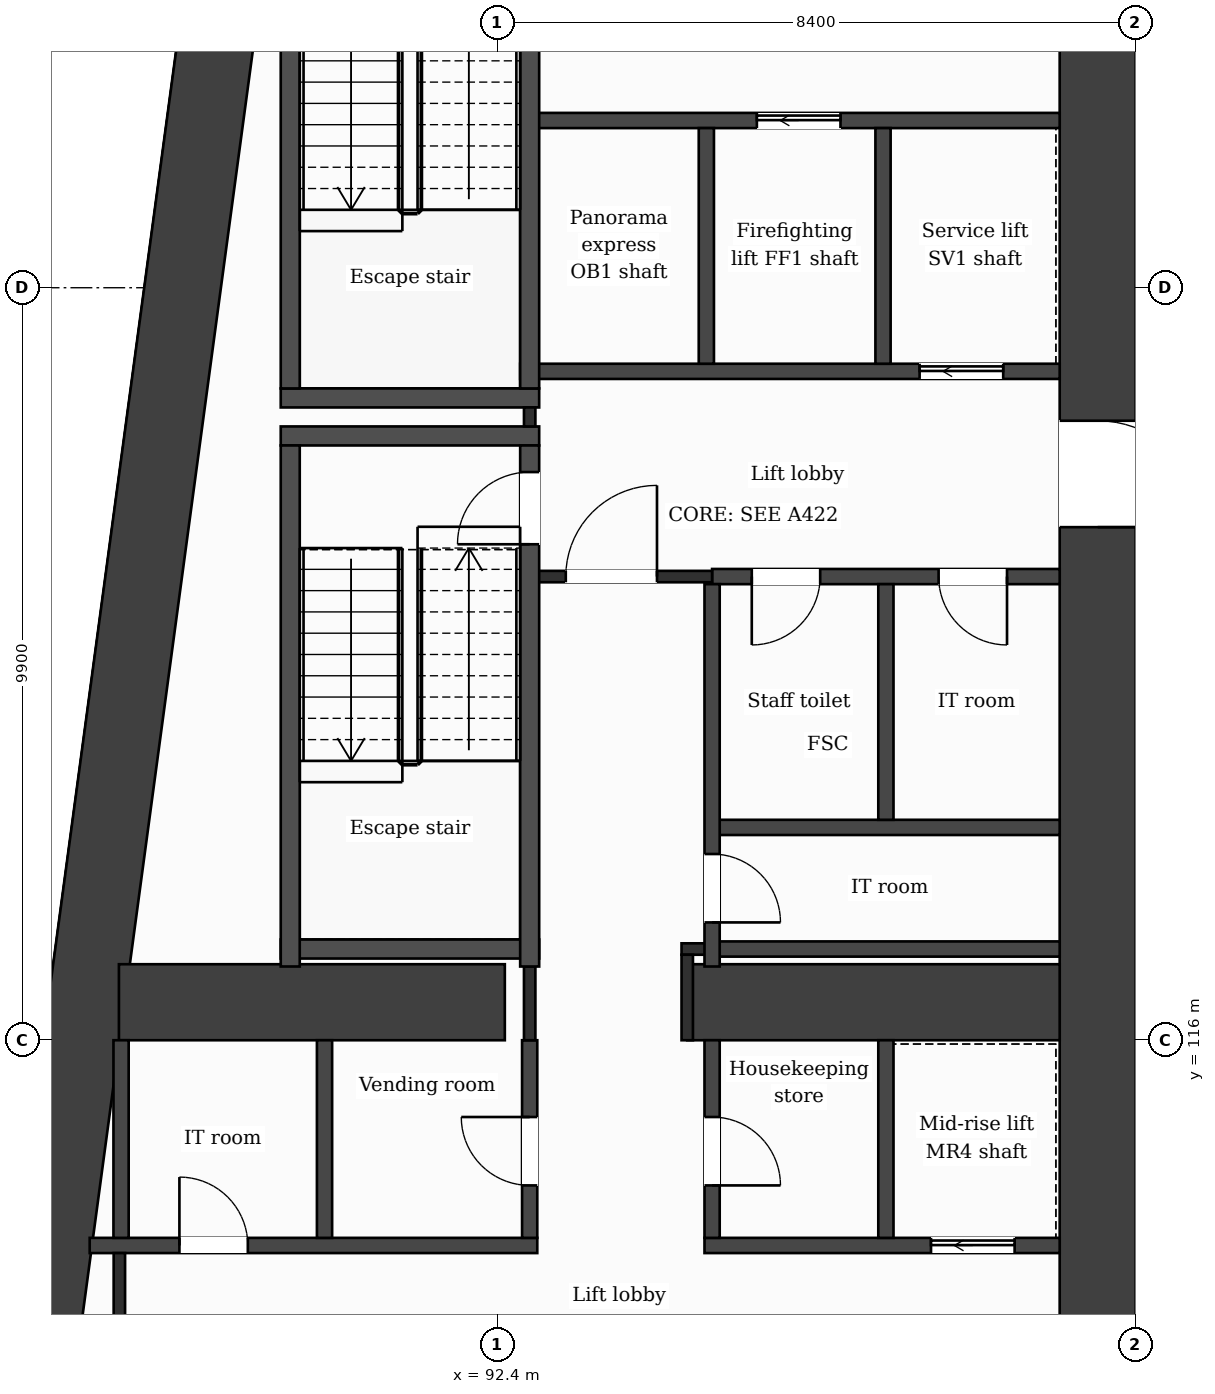
"""IFC4 building model, lengths in metres.
Left out: names, types, materials, properties, quantities, classifications, styles, units other than length and angle.
Written with IfcOpenShell. Run it as: python <this file> out.ifc"""

import sys

from ifc_helpers import new_model, si_unit, direction, frame, frame_2d, origin, place, context, subcontext, project, spatial, rectangle, extrude, element, fill, save


model = new_model("IFC4")
c1 = context("Model", 3, precision=1e-05, world=origin(), true_north=direction((0.0, 1.0)))
c2 = subcontext(c1, "Body", "Model", "MODEL_VIEW")
j1 = project(units=[si_unit("LENGTHUNIT", "METRE"), si_unit("PLANEANGLEUNIT", "RADIAN")], contexts=[c1])
p1 = place(None, origin())
s1 = spatial("IfcSite", under=j1, at=p1, CompositionType="ELEMENT")
p2 = place(p1, origin())
s2 = spatial("IfcBuilding", under=s1, at=p2, CompositionType="ELEMENT")
p3 = place(p2, frame((0.0, 0.0, 94.7)))
s3 = spatial("IfcBuildingStorey", under=s2, at=p3, CompositionType="ELEMENT", Elevation=94.7)
p4 = place(p3, frame((100.3, 131.9, 0.0), z_axis=(0.0, 0.0, 1.0), x_axis=(0.0, -1.0, 0.0)))
e1 = element("IfcWall", 1, at=p4, inside=s3, PredefinedType="SHEAR", context=c2, shape_type="SweptSolid", body=[
    extrude(rectangle(XDim=21.0, YDim=1.0, at=frame_2d((10.5, 0.0))), origin(), (0.0, 0.0, 1.0), 3.7),
])
p5 = place(p4, frame((7.75, 0.0, 0.0)))
e2 = element("IfcOpeningElement", 2, at=p5, cuts=e1, PredefinedType="OPENING", context=c2, shape_type="SweptSolid", body=[
    extrude(rectangle(XDim=1.4, YDim=2.1, at=frame_2d((0.7, 1.05))), frame((0.0, 0.51, 0.0), z_axis=(0.0, -1.0, 0.0), x_axis=(1.0, 0.0, 0.0)), (0.0, 0.0, 1.0), 1.02),
])
p6 = place(p3, frame((86.241, 110.9, 0.0), z_axis=(0.0, 0.0, 1.0), x_axis=(0.133411141623, 0.991060778808, 0.0)))
e3 = element("IfcWall", 3, at=p6, inside=s3, PredefinedType="SHEAR", context=c2, shape_type="SweptSolid", body=[
    extrude(rectangle(XDim=21.189, YDim=1.0, at=frame_2d((10.595, 0.0))), origin(), (0.0, 0.0, 1.0), 3.7),
])
p7 = place(p3, frame((87.423, 116.5, 0.0), z_axis=(0.0, 0.0, 1.0), x_axis=(1.0, 0.0, 0.0)))
e4 = element("IfcWall", 4, at=p7, inside=s3, PredefinedType="SHEAR", context=c2, shape_type="SweptSolid", body=[
    extrude(rectangle(XDim=5.077, YDim=1.0, at=frame_2d((2.539, 0.0))), origin(), (0.0, 0.0, 1.0), 3.7),
])
p8 = place(p3, frame((94.9, 116.5, 0.0), z_axis=(0.0, 0.0, 1.0), x_axis=(1.0, 0.0, 0.0)))
e5 = element("IfcWall", 5, at=p8, inside=s3, PredefinedType="SHEAR", context=c2, shape_type="SweptSolid", body=[
    extrude(rectangle(XDim=4.9, YDim=1.0, at=frame_2d((2.45, 0.0))), origin(), (0.0, 0.0, 1.0), 3.7),
])
p9 = place(p3, frame((87.039, 113.3, 0.0), z_axis=(0.0, 0.0, 1.0), x_axis=(1.0, 0.0, 0.0)))
e6 = element("IfcWall", 6, at=p9, inside=s3, PredefinedType="PARTITIONING", context=c2, shape_type="SweptSolid", body=[
    extrude(rectangle(XDim=5.888, YDim=0.2, at=frame_2d((2.944, 0.0))), origin(), (0.0, 0.0, 1.0), 3.38),
])
p10 = place(p9, frame((1.18, 0.0, 0.0)))
e7 = element("IfcOpeningElement", 7, at=p10, cuts=e6, PredefinedType="OPENING", context=c2, shape_type="SweptSolid", body=[
    extrude(rectangle(XDim=0.9, YDim=2.1, at=frame_2d((0.45, 1.05))), frame((0.0, 0.11, 0.0), z_axis=(0.0, -1.0, 0.0), x_axis=(1.0, 0.0, 0.0)), (0.0, 0.0, 1.0), 0.22),
])
p11 = place(p3, frame((95.127, 113.3, 0.0), z_axis=(0.0, 0.0, 1.0), x_axis=(1.0, 0.0, 0.0)))
e8 = element("IfcWall", 8, at=p11, inside=s3, PredefinedType="PARTITIONING", context=c2, shape_type="SweptSolid", body=[
    extrude(rectangle(XDim=4.673, YDim=0.2, at=frame_2d((2.336, 0.0))), origin(), (0.0, 0.0, 1.0), 3.38),
])
p12 = place(p11, frame((2.98, 0.0, 0.0)))
e9 = element("IfcOpeningElement", 9, at=p12, cuts=e8, PredefinedType="OPENING", context=c2, shape_type="SweptSolid", body=[
    extrude(rectangle(XDim=1.1, YDim=2.1, at=frame_2d((0.55, 1.05))), frame((0.0, 0.11, 0.0), z_axis=(0.0, -1.0, 0.0), x_axis=(1.0, 0.0, 0.0)), (0.0, 0.0, 1.0), 0.22),
])
p13 = place(p3, frame((95.227, 117.2, 0.0), z_axis=(0.0, 0.0, 1.0), x_axis=(1.0, 0.0, 0.0)))
e10 = element("IfcWall", 10, at=p13, inside=s3, PredefinedType="PARTITIONING", context=c2, shape_type="SweptSolid", body=[
    extrude(rectangle(XDim=4.573, YDim=0.2, at=frame_2d((2.287, 0.0))), origin(), (0.0, 0.0, 1.0), 3.38),
])
p14 = place(p3, frame((94.825, 117.2, 0.0), z_axis=(0.0, 0.0, 1.0), x_axis=(1.0, 0.0, 0.0)))
e11 = element("IfcWall", 11, at=p14, inside=s3, PredefinedType="PARTITIONING", context=c2, shape_type="SweptSolid", body=[
    extrude(rectangle(XDim=0.402, YDim=0.15, at=frame_2d((0.201, 0.0))), origin(), (0.0, 0.0, 1.0), 3.38),
])
p15 = place(p3, frame((89.552, 117.2, 0.0), z_axis=(0.0, 0.0, 1.0), x_axis=(1.0, 0.0, 0.0)))
e12 = element("IfcWall", 12, at=p15, inside=s3, PredefinedType="PARTITIONING", context=c2, shape_type="SweptSolid", body=[
    extrude(rectangle(XDim=3.4, YDim=0.25, at=frame_2d((1.7, 0.0))), origin(), (0.0, 0.0, 1.0), 3.38),
])
p16 = place(p3, frame((95.227, 118.8, 0.0), z_axis=(0.0, 0.0, 1.0), x_axis=(1.0, 0.0, 0.0)))
e13 = element("IfcWall", 13, at=p16, inside=s3, PredefinedType="PARTITIONING", context=c2, shape_type="SweptSolid", body=[
    extrude(rectangle(XDim=4.573, YDim=0.2, at=frame_2d((2.287, 0.0))), origin(), (0.0, 0.0, 1.0), 3.38),
])
p17 = place(p3, frame((95.227, 122.1, 0.0), z_axis=(0.0, 0.0, 1.0), x_axis=(1.0, 0.0, 0.0)))
e14 = element("IfcWall", 14, at=p17, inside=s3, PredefinedType="PARTITIONING", context=c2, shape_type="SweptSolid", body=[
    extrude(rectangle(XDim=4.573, YDim=0.2, at=frame_2d((2.287, 0.0))), origin(), (0.0, 0.0, 1.0), 3.38),
])
p18 = place(p17, frame((0.522, 0.0, 0.0)))
e15 = element("IfcOpeningElement", 15, at=p18, cuts=e14, PredefinedType="OPENING", context=c2, shape_type="SweptSolid", body=[
    extrude(rectangle(XDim=0.9, YDim=2.1, at=frame_2d((0.45, 1.05))), frame((0.0, 0.11, 0.0), z_axis=(0.0, -1.0, 0.0), x_axis=(1.0, 0.0, 0.0)), (0.0, 0.0, 1.0), 0.22),
])
p19 = place(p17, frame((2.98, 0.0, 0.0)))
e16 = element("IfcOpeningElement", 16, at=p19, cuts=e14, PredefinedType="OPENING", context=c2, shape_type="SweptSolid", body=[
    extrude(rectangle(XDim=0.9, YDim=2.1, at=frame_2d((0.45, 1.05))), frame((0.0, 0.11, 0.0), z_axis=(0.0, -1.0, 0.0), x_axis=(1.0, 0.0, 0.0)), (0.0, 0.0, 1.0), 0.22),
])
p20 = place(p3, frame((92.827, 122.1, 0.0), z_axis=(0.0, 0.0, 1.0), x_axis=(1.0, 0.0, 0.0)))
e17 = element("IfcWall", 17, at=p20, inside=s3, PredefinedType="PARTITIONING", context=c2, shape_type="SweptSolid", body=[
    extrude(rectangle(XDim=2.4, YDim=0.15, at=frame_2d((1.2, 0.0))), origin(), (0.0, 0.0, 1.0), 3.38),
])
p21 = place(p20, frame((0.475, 0.0, 0.0)))
e18 = element("IfcOpeningElement", 18, at=p21, cuts=e17, PredefinedType="OPENING", context=c2, shape_type="SweptSolid", body=[
    extrude(rectangle(XDim=1.2, YDim=2.1, at=frame_2d((0.6, 1.05))), frame((0.0, 0.085, 0.0), z_axis=(0.0, -1.0, 0.0), x_axis=(1.0, 0.0, 0.0)), (0.0, 0.0, 1.0), 0.17),
])
for number, where, z_axis, x_axis in (
    (19, (89.552, 123.95, 0.0), (0.0, 0.0, 1.0), (1.0, 0.0, 0.0)),
    (20, (89.552, 124.45, 0.0), (0.0, 0.0, 1.0), (1.0, 0.0, 0.0)),
):
    element("IfcWall", number, at=place(p3, frame(where, z_axis=z_axis, x_axis=x_axis)), inside=s3, PredefinedType="PARTITIONING", context=c2, shape_type="SweptSolid", body=[
        extrude(rectangle(XDim=3.4, YDim=0.25, at=frame_2d((1.7, 0.0))), origin(), (0.0, 0.0, 1.0), 3.38),
    ])
p22 = place(p3, frame((92.702, 124.8, 0.0), z_axis=(0.0, 0.0, 1.0), x_axis=(1.0, 0.0, 0.0)))
e21 = element("IfcWall", 21, at=p22, inside=s3, PredefinedType="PARTITIONING", context=c2, shape_type="SweptSolid", body=[
    extrude(rectangle(XDim=7.098, YDim=0.2, at=frame_2d((3.549, 0.0))), origin(), (0.0, 0.0, 1.0), 3.38),
])
p23 = place(p22, frame((5.255, 0.0, 0.0)))
e22 = element("IfcOpeningElement", 22, at=p23, cuts=e21, PredefinedType="OPENING", context=c2, shape_type="SweptSolid", body=[
    extrude(rectangle(XDim=1.1, YDim=2.1, at=frame_2d((0.55, 1.05))), frame((0.0, 0.11, 0.0), z_axis=(0.0, -1.0, 0.0), x_axis=(1.0, 0.0, 0.0)), (0.0, 0.0, 1.0), 0.22),
])
p24 = place(p3, frame((92.827, 128.1, 0.0), z_axis=(0.0, 0.0, 1.0), x_axis=(1.0, 0.0, 0.0)))
e23 = element("IfcWall", 23, at=p24, inside=s3, PredefinedType="PARTITIONING", context=c2, shape_type="SweptSolid", body=[
    extrude(rectangle(XDim=6.973, YDim=0.2, at=frame_2d((3.487, 0.0))), origin(), (0.0, 0.0, 1.0), 3.38),
])
p25 = place(p24, frame((2.989, 0.0, 0.0)))
e24 = element("IfcOpeningElement", 24, at=p25, cuts=e23, PredefinedType="OPENING", context=c2, shape_type="SweptSolid", body=[
    extrude(rectangle(XDim=1.1, YDim=2.1, at=frame_2d((0.55, 1.05))), frame((0.0, 0.11, 0.0), z_axis=(0.0, -1.0, 0.0), x_axis=(1.0, 0.0, 0.0)), (0.0, 0.0, 1.0), 0.22),
])
p26 = place(p3, frame((87.451, 113.4, 0.0), z_axis=(0.0, 0.0, 1.0), x_axis=(0.0, 1.0, 0.0)))
e25 = element("IfcWall", 25, at=p26, inside=s3, PredefinedType="PARTITIONING", context=c2, shape_type="SweptSolid", body=[
    extrude(rectangle(XDim=2.6, YDim=0.2, at=frame_2d((1.3, 0.0))), origin(), (0.0, 0.0, 1.0), 3.38),
])
p27 = place(p3, frame((87.429, 111.4, 0.0), z_axis=(0.0, 0.0, 1.0), x_axis=(0.0, 1.0, 0.0)))
e26 = element("IfcWall", 26, at=p27, inside=s3, PredefinedType="PARTITIONING", context=c2, shape_type="SweptSolid", body=[
    extrude(rectangle(XDim=1.8, YDim=0.15, at=frame_2d((0.9, 0.0))), origin(), (0.0, 0.0, 1.0), 3.38),
])
for number, where, z_axis, x_axis in (
    (27, (89.677, 116.97, 0.0), (0.0, 0.0, 1.0), (0.0, 1.0, 0.0)),
    (28, (89.677, 124.575, 0.0), (0.0, 0.0, 1.0), (0.0, 1.0, 0.0)),
):
    element("IfcWall", number, at=place(p3, frame(where, z_axis=z_axis, x_axis=x_axis)), inside=s3, PredefinedType="PARTITIONING", context=c2, shape_type="SweptSolid", body=[
        extrude(rectangle(XDim=6.855, YDim=0.25, at=frame_2d((3.427, 0.0))), origin(), (0.0, 0.0, 1.0), 3.38),
    ])
p28 = place(p3, frame((90.128, 113.4, 0.0), z_axis=(0.0, 0.0, 1.0), x_axis=(0.0, 1.0, 0.0)))
e29 = element("IfcWall", 29, at=p28, inside=s3, PredefinedType="PARTITIONING", context=c2, shape_type="SweptSolid", body=[
    extrude(rectangle(XDim=2.6, YDim=0.2, at=frame_2d((1.3, 0.0))), origin(), (0.0, 0.0, 1.0), 3.38),
])
p29 = place(p3, frame((92.827, 113.4, 0.0), z_axis=(0.0, 0.0, 1.0), x_axis=(0.0, 1.0, 0.0)))
e30 = element("IfcWall", 30, at=p29, inside=s3, PredefinedType="PARTITIONING", context=c2, shape_type="SweptSolid", body=[
    extrude(rectangle(XDim=2.6, YDim=0.2, at=frame_2d((1.3, 0.0))), origin(), (0.0, 0.0, 1.0), 3.38),
])
p30 = place(p29, frame((0.69, 0.0, 0.0)))
e31 = element("IfcOpeningElement", 31, at=p30, cuts=e30, PredefinedType="OPENING", context=c2, shape_type="SweptSolid", body=[
    extrude(rectangle(XDim=0.9, YDim=2.1, at=frame_2d((0.45, 1.05))), frame((0.0, 0.11, 0.0), z_axis=(0.0, -1.0, 0.0), x_axis=(1.0, 0.0, 0.0)), (0.0, 0.0, 1.0), 0.22),
])
p31 = place(p3, frame((92.827, 116.0, 0.0), z_axis=(0.0, 0.0, 1.0), x_axis=(0.0, 1.0, 0.0)))
e32 = element("IfcWall", 32, at=p31, inside=s3, PredefinedType="PARTITIONING", context=c2, shape_type="SweptSolid", body=[
    extrude(rectangle(XDim=0.97, YDim=0.15, at=frame_2d((0.485, 0.0))), origin(), (0.0, 0.0, 1.0), 3.38),
])
p32 = place(p3, frame((92.827, 124.075, 0.0), z_axis=(0.0, 0.0, 1.0), x_axis=(0.0, 1.0, 0.0)))
e33 = element("IfcWall", 33, at=p32, inside=s3, PredefinedType="PARTITIONING", context=c2, shape_type="SweptSolid", body=[
    extrude(rectangle(XDim=0.25, YDim=0.15, at=frame_2d((0.125, 0.0))), origin(), (0.0, 0.0, 1.0), 3.38),
])
p33 = place(p3, frame((92.827, 116.97, 0.0), z_axis=(0.0, 0.0, 1.0), x_axis=(0.0, 1.0, 0.0)))
e34 = element("IfcWall", 34, at=p33, inside=s3, PredefinedType="PARTITIONING", context=c2, shape_type="SweptSolid", body=[
    extrude(rectangle(XDim=6.855, YDim=0.25, at=frame_2d((3.427, 0.0))), origin(), (0.0, 0.0, 1.0), 3.38),
])
p34 = place(p33, frame((5.555, 0.0, 0.0)))
e35 = element("IfcOpeningElement", 35, at=p34, cuts=e34, PredefinedType="OPENING", context=c2, shape_type="SweptSolid", body=[
    extrude(rectangle(XDim=0.95, YDim=2.1, at=frame_2d((0.475, 1.05))), frame((0.0, 0.135, 0.0), z_axis=(0.0, -1.0, 0.0), x_axis=(1.0, 0.0, 0.0)), (0.0, 0.0, 1.0), 0.27),
])
p35 = place(p3, frame((92.827, 124.575, 0.0), z_axis=(0.0, 0.0, 1.0), x_axis=(0.0, 1.0, 0.0)))
e36 = element("IfcWall", 36, at=p35, inside=s3, PredefinedType="PARTITIONING", context=c2, shape_type="SweptSolid", body=[
    extrude(rectangle(XDim=6.855, YDim=0.25, at=frame_2d((3.427, 0.0))), origin(), (0.0, 0.0, 1.0), 3.38),
])
p36 = place(p35, frame((5.325, 0.0, 0.0)))
e37 = element("IfcOpeningElement", 37, at=p36, cuts=e36, PredefinedType="OPENING", context=c2, shape_type="SweptSolid", body=[
    extrude(rectangle(XDim=1.0, YDim=2.1, at=frame_2d((0.5, 1.05))), frame((0.0, 0.135, 0.0), z_axis=(0.0, -1.0, 0.0), x_axis=(1.0, 0.0, 0.0)), (0.0, 0.0, 1.0), 0.27),
])
p37 = place(p3, frame((94.9, 116.0, 0.0), z_axis=(0.0, 0.0, 1.0), x_axis=(0.0, 1.0, 0.0)))
e38 = element("IfcWall", 38, at=p37, inside=s3, PredefinedType="PARTITIONING", context=c2, shape_type="SweptSolid", body=[
    extrude(rectangle(XDim=1.125, YDim=0.15, at=frame_2d((0.562, 0.0))), origin(), (0.0, 0.0, 1.0), 3.38),
])
p38 = place(p3, frame((95.151, 124.9, 0.0), z_axis=(0.0, 0.0, 1.0), x_axis=(0.0, 1.0, 0.0)))
e39 = element("IfcWall", 39, at=p38, inside=s3, PredefinedType="PARTITIONING", context=c2, shape_type="SweptSolid", body=[
    extrude(rectangle(XDim=3.1, YDim=0.2, at=frame_2d((1.55, 0.0))), origin(), (0.0, 0.0, 1.0), 3.38),
])
p39 = place(p3, frame((95.227, 113.4, 0.0), z_axis=(0.0, 0.0, 1.0), x_axis=(0.0, 1.0, 0.0)))
e40 = element("IfcWall", 40, at=p39, inside=s3, PredefinedType="PARTITIONING", context=c2, shape_type="SweptSolid", body=[
    extrude(rectangle(XDim=2.6, YDim=0.2, at=frame_2d((1.3, 0.0))), origin(), (0.0, 0.0, 1.0), 3.38),
])
p40 = place(p39, frame((0.69, 0.0, 0.0)))
e41 = element("IfcOpeningElement", 41, at=p40, cuts=e40, PredefinedType="OPENING", context=c2, shape_type="SweptSolid", body=[
    extrude(rectangle(XDim=0.9, YDim=2.1, at=frame_2d((0.45, 1.05))), frame((0.0, 0.11, 0.0), z_axis=(0.0, -1.0, 0.0), x_axis=(1.0, 0.0, 0.0)), (0.0, 0.0, 1.0), 0.22),
])
p41 = place(p3, frame((95.227, 116.97, 0.0), z_axis=(0.0, 0.0, 1.0), x_axis=(0.0, 1.0, 0.0)))
e42 = element("IfcWall", 42, at=p41, inside=s3, PredefinedType="PARTITIONING", context=c2, shape_type="SweptSolid", body=[
    extrude(rectangle(XDim=5.03, YDim=0.2, at=frame_2d((2.515, 0.0))), origin(), (0.0, 0.0, 1.0), 3.38),
])
p42 = place(p41, frame((0.58, 0.0, 0.0)))
e43 = element("IfcOpeningElement", 43, at=p42, cuts=e42, PredefinedType="OPENING", context=c2, shape_type="SweptSolid", body=[
    extrude(rectangle(XDim=0.9, YDim=2.1, at=frame_2d((0.45, 1.05))), frame((0.0, 0.11, 0.0), z_axis=(0.0, -1.0, 0.0), x_axis=(1.0, 0.0, 0.0)), (0.0, 0.0, 1.0), 0.22),
])
p43 = place(p3, frame((97.476, 124.9, 0.0), z_axis=(0.0, 0.0, 1.0), x_axis=(0.0, 1.0, 0.0)))
e44 = element("IfcWall", 44, at=p43, inside=s3, PredefinedType="PARTITIONING", context=c2, shape_type="SweptSolid", body=[
    extrude(rectangle(XDim=3.1, YDim=0.2, at=frame_2d((1.55, 0.0))), origin(), (0.0, 0.0, 1.0), 3.38),
])
p44 = place(p3, frame((97.513, 113.4, 0.0), z_axis=(0.0, 0.0, 1.0), x_axis=(0.0, 1.0, 0.0)))
e45 = element("IfcWall", 45, at=p44, inside=s3, PredefinedType="PARTITIONING", context=c2, shape_type="SweptSolid", body=[
    extrude(rectangle(XDim=2.6, YDim=0.2, at=frame_2d((1.3, 0.0))), origin(), (0.0, 0.0, 1.0), 3.38),
])
p45 = place(p3, frame((97.513, 118.9, 0.0), z_axis=(0.0, 0.0, 1.0), x_axis=(0.0, 1.0, 0.0)))
e46 = element("IfcWall", 46, at=p45, inside=s3, PredefinedType="PARTITIONING", context=c2, shape_type="SweptSolid", body=[
    extrude(rectangle(XDim=3.1, YDim=0.2, at=frame_2d((1.55, 0.0))), origin(), (0.0, 0.0, 1.0), 3.38),
])
p46 = place(p21, origin())
e47 = element("IfcDoor", 47, at=p46, inside=s3, OperationType="SINGLE_SWING_RIGHT", PredefinedType="DOOR", context=c2, shape_type="SweptSolid", body=[
    extrude(rectangle(XDim=1.2, YDim=2.1, at=frame_2d((0.6, 1.05))), frame((0.0, 0.025, 0.0), z_axis=(0.0, -1.0, 0.0), x_axis=(1.0, 0.0, 0.0)), (0.0, 0.0, 1.0), 0.05),
])
fill(e18, e47)
p47 = place(p25, origin())
e48 = element("IfcDoor", 48, at=p47, inside=s3, OperationType="SLIDING_TO_LEFT", PredefinedType="DOOR", context=c2, shape_type="SweptSolid", body=[
    extrude(rectangle(XDim=1.1, YDim=2.1, at=frame_2d((0.55, 1.05))), frame((0.0, 0.025, 0.0), z_axis=(0.0, -1.0, 0.0), x_axis=(1.0, 0.0, 0.0)), (0.0, 0.0, 1.0), 0.05),
])
fill(e24, e48)
p48 = place(p23, origin())
e49 = element("IfcDoor", 49, at=p48, inside=s3, OperationType="SLIDING_TO_LEFT", PredefinedType="DOOR", context=c2, shape_type="SweptSolid", body=[
    extrude(rectangle(XDim=1.1, YDim=2.1, at=frame_2d((0.55, 1.05))), frame((0.0, 0.025, 0.0), z_axis=(0.0, -1.0, 0.0), x_axis=(1.0, 0.0, 0.0)), (0.0, 0.0, 1.0), 0.05),
])
fill(e22, e49)
p49 = place(p18, origin())
e50 = element("IfcDoor", 50, at=p49, inside=s3, OperationType="SINGLE_SWING_LEFT", PredefinedType="DOOR", context=c2, shape_type="SweptSolid", body=[
    extrude(rectangle(XDim=0.9, YDim=2.1, at=frame_2d((0.45, 1.05))), frame((0.0, 0.025, 0.0), z_axis=(0.0, -1.0, 0.0), x_axis=(1.0, 0.0, 0.0)), (0.0, 0.0, 1.0), 0.05),
])
fill(e15, e50)
p50 = place(p19, origin())
e51 = element("IfcDoor", 51, at=p50, inside=s3, OperationType="SINGLE_SWING_RIGHT", PredefinedType="DOOR", context=c2, shape_type="SweptSolid", body=[
    extrude(rectangle(XDim=0.9, YDim=2.1, at=frame_2d((0.45, 1.05))), frame((0.0, 0.025, 0.0), z_axis=(0.0, -1.0, 0.0), x_axis=(1.0, 0.0, 0.0)), (0.0, 0.0, 1.0), 0.05),
])
fill(e16, e51)
p51 = place(p34, origin())
e52 = element("IfcDoor", 52, at=p51, inside=s3, OperationType="SINGLE_SWING_LEFT", PredefinedType="DOOR", context=c2, shape_type="SweptSolid", body=[
    extrude(rectangle(XDim=0.95, YDim=2.1, at=frame_2d((0.475, 1.05))), frame((0.0, 0.025, 0.0), z_axis=(0.0, -1.0, 0.0), x_axis=(1.0, 0.0, 0.0)), (0.0, 0.0, 1.0), 0.05),
])
fill(e35, e52)
p52 = place(p42, origin())
e53 = element("IfcDoor", 53, at=p52, inside=s3, OperationType="SINGLE_SWING_LEFT", PredefinedType="DOOR", context=c2, shape_type="SweptSolid", body=[
    extrude(rectangle(XDim=0.9, YDim=2.1, at=frame_2d((0.45, 1.05))), frame((0.0, 0.025, 0.0), z_axis=(0.0, -1.0, 0.0), x_axis=(1.0, 0.0, 0.0)), (0.0, 0.0, 1.0), 0.05),
])
fill(e43, e53)
p53 = place(p12, origin())
e54 = element("IfcDoor", 54, at=p53, inside=s3, OperationType="SLIDING_TO_LEFT", PredefinedType="DOOR", context=c2, shape_type="SweptSolid", body=[
    extrude(rectangle(XDim=1.1, YDim=2.1, at=frame_2d((0.55, 1.05))), frame((0.0, 0.025, 0.0), z_axis=(0.0, -1.0, 0.0), x_axis=(1.0, 0.0, 0.0)), (0.0, 0.0, 1.0), 0.05),
])
fill(e9, e54)
p54 = place(p10, origin())
e55 = element("IfcDoor", 55, at=p54, inside=s3, OperationType="SINGLE_SWING_LEFT", PredefinedType="DOOR", context=c2, shape_type="SweptSolid", body=[
    extrude(rectangle(XDim=0.9, YDim=2.1, at=frame_2d((0.45, 1.05))), frame((0.0, 0.025, 0.0), z_axis=(0.0, -1.0, 0.0), x_axis=(1.0, 0.0, 0.0)), (0.0, 0.0, 1.0), 0.05),
])
fill(e7, e55)
p55 = place(p30, origin())
e56 = element("IfcDoor", 56, at=p55, inside=s3, OperationType="SINGLE_SWING_RIGHT", PredefinedType="DOOR", context=c2, shape_type="SweptSolid", body=[
    extrude(rectangle(XDim=0.9, YDim=2.1, at=frame_2d((0.45, 1.05))), frame((0.0, 0.025, 0.0), z_axis=(0.0, -1.0, 0.0), x_axis=(1.0, 0.0, 0.0)), (0.0, 0.0, 1.0), 0.05),
])
fill(e31, e56)
p56 = place(p40, origin())
e57 = element("IfcDoor", 57, at=p56, inside=s3, OperationType="SINGLE_SWING_LEFT", PredefinedType="DOOR", context=c2, shape_type="SweptSolid", body=[
    extrude(rectangle(XDim=0.9, YDim=2.1, at=frame_2d((0.45, 1.05))), frame((0.0, 0.025, 0.0), z_axis=(0.0, -1.0, 0.0), x_axis=(1.0, 0.0, 0.0)), (0.0, 0.0, 1.0), 0.05),
])
fill(e41, e57)
p57 = place(p5, origin())
e58 = element("IfcDoor", 58, at=p57, inside=s3, OperationType="SINGLE_SWING_RIGHT", PredefinedType="DOOR", context=c2, shape_type="SweptSolid", body=[
    extrude(rectangle(XDim=1.4, YDim=2.1, at=frame_2d((0.7, 1.05))), frame((0.0, 0.025, 0.0), z_axis=(0.0, -1.0, 0.0), x_axis=(1.0, 0.0, 0.0)), (0.0, 0.0, 1.0), 0.05),
])
fill(e2, e58)
save(model, sys.argv[1])
